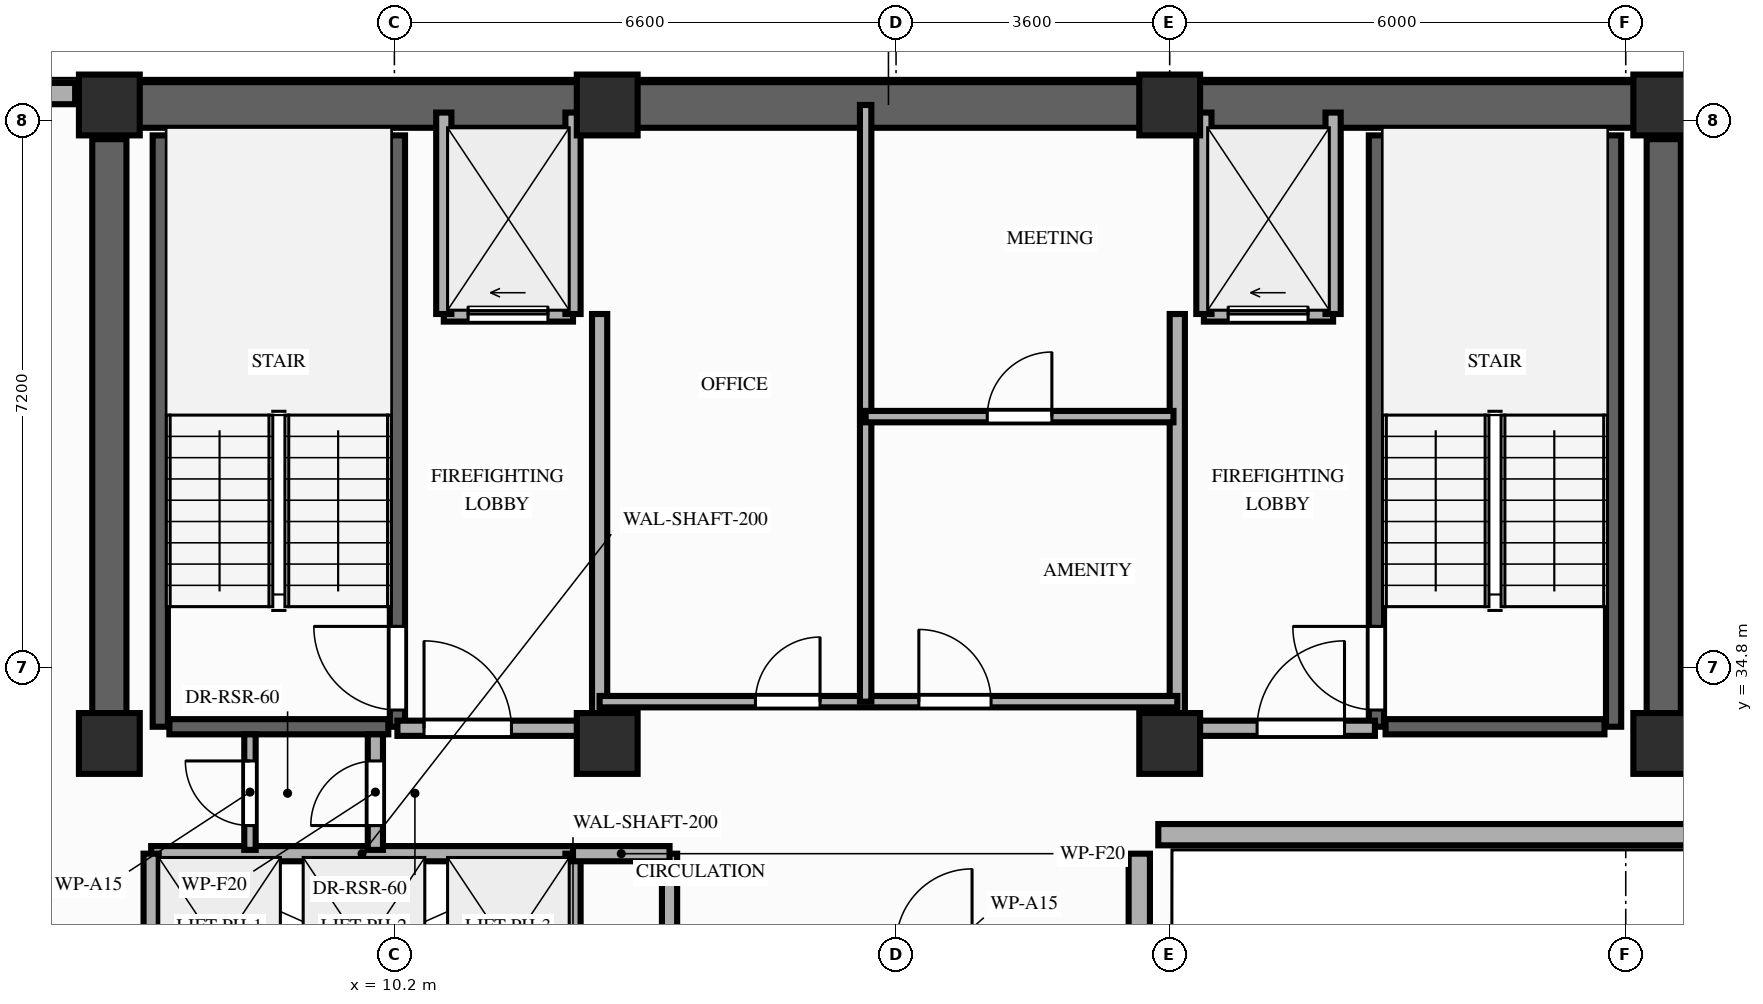
"""IFC4 building model, lengths in metres.
Left out: names, types, materials, properties, quantities, classifications, styles, units other than length and angle.
Written with IfcOpenShell. Run it as: python <this file> out.ifc"""

import sys

from ifc_helpers import new_model, si_unit, direction, frame, frame_2d, origin, origin_2d, place, context, subcontext, project, spatial, rectangle, extrude, element, fill, save


model = new_model("IFC4")
c1 = context("Model", 3, precision=1e-05, world=origin(), true_north=direction((0.0, 1.0)))
c2 = subcontext(c1, "Body", "Model", "MODEL_VIEW")
j1 = project(units=[si_unit("LENGTHUNIT", "METRE"), si_unit("PLANEANGLEUNIT", "RADIAN")], contexts=[c1])
p1 = place(None, origin())
s1 = spatial("IfcSite", under=j1, at=p1, CompositionType="ELEMENT")
p2 = place(p1, origin())
s2 = spatial("IfcBuilding", under=s1, at=p2, CompositionType="ELEMENT")
p3 = place(p2, frame((0.0, 0.0, 231.2)))
s3 = spatial("IfcBuildingStorey", under=s2, at=p3, CompositionType="ELEMENT", Elevation=231.2)
for number, where, z_axis, x_axis in (
    (1, (6.45, 33.8, 0.0), (0.0, 0.0, 1.0), (1.0, 0.0, 0.0)),
    (2, (13.0, 33.8, 0.0), (0.0, 0.0, 1.0), (1.0, 0.0, 0.0)),
    (3, (20.4, 33.8, 0.0), (0.0, 0.0, 1.0), (1.0, 0.0, 0.0)),
    (4, (26.9, 33.8, 0.0), (0.0, 0.0, 1.0), (1.0, 0.0, 0.0)),
    (5, (6.45, 42.2, 0.0), (0.0, 0.0, 1.0), (1.0, 0.0, 0.0)),
    (6, (13.0, 42.2, 0.0), (0.0, 0.0, 1.0), (1.0, 0.0, 0.0)),
    (7, (20.4, 42.2, 0.0), (0.0, 0.0, 1.0), (1.0, 0.0, 0.0)),
    (8, (26.9, 42.2, 0.0), (0.0, 0.0, 1.0), (1.0, 0.0, 0.0)),
):
    element("IfcColumn", number, at=place(p3, frame(where, z_axis=z_axis, x_axis=x_axis)), inside=s3, PredefinedType="COLUMN", context=c2, shape_type="SweptSolid", body=[
        extrude(rectangle(XDim=0.8, YDim=0.8, at=origin_2d()), origin(), (0.0, 0.0, 1.0), 3.2),
    ])
p4 = place(p3, frame((20.0, 8.8, 0.0), z_axis=(0.0, 0.0, 1.0), x_axis=(0.0, 1.0, 0.0)))
e9 = element("IfcWall", 9, at=p4, inside=s3, PredefinedType="STANDARD", context=c2, shape_type="SweptSolid", body=[
    extrude(rectangle(XDim=23.55, YDim=0.28, at=frame_2d((11.775, 0.0))), origin(), (0.0, 0.0, 1.0), 2.56),
])
p5 = place(p4, frame((20.86, 0.0, 0.85)))
e10 = element("IfcOpeningElement", 10, at=p5, cuts=e9, PredefinedType="OPENING", context=c2, shape_type="SweptSolid", body=[
    extrude(rectangle(XDim=1.1, YDim=1.46, at=frame_2d((0.55, 0.73))), frame((0.0, 0.15, 0.0), z_axis=(0.0, -1.0, 0.0), x_axis=(1.0, 0.0, 0.0)), (0.0, 0.0, 1.0), 0.3),
])
p6 = place(p4, frame((4.58, 0.0, 0.85)))
e11 = element("IfcOpeningElement", 11, at=p6, cuts=e9, PredefinedType="OPENING", context=c2, shape_type="SweptSolid", body=[
    extrude(rectangle(XDim=0.8, YDim=1.46, at=frame_2d((0.4, 0.73))), frame((0.0, 0.15, 0.0), z_axis=(0.0, -1.0, 0.0), x_axis=(1.0, 0.0, 0.0)), (0.0, 0.0, 1.0), 0.3),
])
p7 = place(p4, frame((10.85, 0.0, 0.85)))
e12 = element("IfcOpeningElement", 12, at=p7, cuts=e9, PredefinedType="OPENING", context=c2, shape_type="SweptSolid", body=[
    extrude(rectangle(XDim=2.1, YDim=1.46, at=frame_2d((1.05, 0.73))), frame((0.0, 0.15, 0.0), z_axis=(0.0, -1.0, 0.0), x_axis=(1.0, 0.0, 0.0)), (0.0, 0.0, 1.0), 0.3),
])
p8 = place(p3, frame((6.0, 42.35, 0.0), z_axis=(0.0, 0.0, 1.0), x_axis=(-1.0, 0.0, 0.0)))
e13 = element("IfcWall", 13, at=p8, inside=s3, PredefinedType="STANDARD", context=c2, shape_type="SweptSolid", body=[
    extrude(rectangle(XDim=2.0, YDim=0.28, at=frame_2d((1.0, 0.0))), origin(), (0.0, 0.0, 1.0), 3.02),
])
p9 = place(p3, frame((20.25, 32.6, 0.0), z_axis=(0.0, 0.0, 1.0), x_axis=(1.0, 0.0, 0.0)))
e14 = element("IfcWall", 14, at=p9, inside=s3, PredefinedType="STANDARD", context=c2, shape_type="SweptSolid", body=[
    extrude(rectangle(XDim=7.35, YDim=0.28, at=frame_2d((3.675, 0.0))), origin(), (0.0, 0.0, 1.0), 2.56),
])
p10 = place(p3, frame((6.45, 42.2, 0.0), z_axis=(0.0, 0.0, 1.0), x_axis=(1.0, 0.0, 0.0)))
e15 = element("IfcWall", 15, at=p10, inside=s3, PredefinedType="SHEAR", context=c2, shape_type="SweptSolid", body=[
    extrude(rectangle(XDim=20.45, YDim=0.6, at=frame_2d((10.225, 0.0))), origin(), (0.0, 0.0, 1.0), 3.02),
])
for number, where, z_axis, x_axis in (
    (16, (6.45, 33.8, 0.0), (0.0, 0.0, 1.0), (0.0, 1.0, 0.0)),
    (17, (26.9, 33.8, 0.0), (0.0, 0.0, 1.0), (0.0, 1.0, 0.0)),
):
    element("IfcWall", number, at=place(p3, frame(where, z_axis=z_axis, x_axis=x_axis)), inside=s3, PredefinedType="SHEAR", context=c2, shape_type="SweptSolid", body=[
        extrude(rectangle(XDim=7.95, YDim=0.45, at=frame_2d((3.975, 0.0))), origin(), (0.0, 0.0, 1.0), 3.02),
    ])
p11 = place(p3, frame((7.12, 34.02, 0.0), z_axis=(0.0, 0.0, 1.0), x_axis=(0.0, 1.0, 0.0)))
e18 = element("IfcWall", 18, at=p11, inside=s3, PredefinedType="SHEAR", context=c2, shape_type="SweptSolid", body=[
    extrude(rectangle(XDim=7.78, YDim=0.2, at=frame_2d((3.89, 0.0))), origin(), (0.0, 0.0, 1.0), 3.02),
])
p12 = place(p3, frame((10.24, 34.02, 0.0), z_axis=(0.0, 0.0, 1.0), x_axis=(0.0, 1.0, 0.0)))
e19 = element("IfcWall", 19, at=p12, inside=s3, PredefinedType="SHEAR", context=c2, shape_type="SweptSolid", body=[
    extrude(rectangle(XDim=7.78, YDim=0.2, at=frame_2d((3.89, 0.0))), origin(), (0.0, 0.0, 1.0), 3.02),
])
p13 = place(p12, frame((0.22, 0.0, 0.0)))
e20 = element("IfcOpeningElement", 20, at=p13, cuts=e19, PredefinedType="OPENING", context=c2, shape_type="SweptSolid", body=[
    extrude(rectangle(XDim=1.1, YDim=2.15, at=frame_2d((0.55, 1.075))), frame((0.0, 0.11, 0.0), z_axis=(0.0, -1.0, 0.0), x_axis=(1.0, 0.0, 0.0)), (0.0, 0.0, 1.0), 0.22),
])
p14 = place(p3, frame((7.24, 34.02, 0.0), z_axis=(0.0, 0.0, 1.0), x_axis=(1.0, 0.0, 0.0)))
e21 = element("IfcWall", 21, at=p14, inside=s3, PredefinedType="SHEAR", context=c2, shape_type="SweptSolid", body=[
    extrude(rectangle(XDim=2.88, YDim=0.2, at=frame_2d((1.44, 0.0))), origin(), (0.0, 0.0, 1.0), 3.02),
])
p15 = place(p3, frame((23.12, 34.02, 0.0), z_axis=(0.0, 0.0, 1.0), x_axis=(0.0, 1.0, 0.0)))
e22 = element("IfcWall", 22, at=p15, inside=s3, PredefinedType="SHEAR", context=c2, shape_type="SweptSolid", body=[
    extrude(rectangle(XDim=7.78, YDim=0.2, at=frame_2d((3.89, 0.0))), origin(), (0.0, 0.0, 1.0), 3.02),
])
p16 = place(p15, frame((0.22, 0.0, 0.0)))
e23 = element("IfcOpeningElement", 23, at=p16, cuts=e22, PredefinedType="OPENING", context=c2, shape_type="SweptSolid", body=[
    extrude(rectangle(XDim=1.1, YDim=2.15, at=frame_2d((0.55, 1.075))), frame((0.0, 0.11, 0.0), z_axis=(0.0, -1.0, 0.0), x_axis=(1.0, 0.0, 0.0)), (0.0, 0.0, 1.0), 0.22),
])
p17 = place(p3, frame((26.24, 34.02, 0.0), z_axis=(0.0, 0.0, 1.0), x_axis=(0.0, 1.0, 0.0)))
e24 = element("IfcWall", 24, at=p17, inside=s3, PredefinedType="SHEAR", context=c2, shape_type="SweptSolid", body=[
    extrude(rectangle(XDim=7.78, YDim=0.2, at=frame_2d((3.89, 0.0))), origin(), (0.0, 0.0, 1.0), 3.02),
])
p18 = place(p3, frame((23.24, 34.02, 0.0), z_axis=(0.0, 0.0, 1.0), x_axis=(1.0, 0.0, 0.0)))
e25 = element("IfcWall", 25, at=p18, inside=s3, PredefinedType="SHEAR", context=c2, shape_type="SweptSolid", body=[
    extrude(rectangle(XDim=2.88, YDim=0.2, at=frame_2d((1.44, 0.0))), origin(), (0.0, 0.0, 1.0), 3.02),
])
p19 = place(p3, frame((7.0, 32.35, 0.0), z_axis=(0.0, 0.0, 1.0), x_axis=(1.0, 0.0, 0.0)))
e26 = element("IfcWall", 26, at=p19, inside=s3, PredefinedType="MOVABLE", context=c2, shape_type="SweptSolid", body=[
    extrude(rectangle(XDim=5.55, YDim=0.2, at=frame_2d((2.775, 0.0))), origin(), (0.0, 0.0, 1.0), 3.02),
])
for number, where, z_axis, x_axis in (
    (27, (7.0, 29.85, 0.0), (0.0, 0.0, 1.0), (0.0, 1.0, 0.0)),
    (28, (12.55, 29.85, 0.0), (0.0, 0.0, 1.0), (0.0, 1.0, 0.0)),
):
    element("IfcWall", number, at=place(p3, frame(where, z_axis=z_axis, x_axis=x_axis)), inside=s3, PredefinedType="MOVABLE", context=c2, shape_type="SweptSolid", body=[
        extrude(rectangle(XDim=2.5, YDim=0.2, at=frame_2d((1.25, 0.0))), origin(), (0.0, 0.0, 1.0), 3.02),
    ])
p20 = place(p3, frame((10.85, 39.45, 0.0), z_axis=(0.0, 0.0, 1.0), x_axis=(1.0, 0.0, 0.0)))
e29 = element("IfcWall", 29, at=p20, inside=s3, PredefinedType="MOVABLE", context=c2, shape_type="SweptSolid", body=[
    extrude(rectangle(XDim=1.7, YDim=0.2, at=frame_2d((0.85, 0.0))), origin(), (0.0, 0.0, 1.0), 3.02),
])
p21 = place(p20, frame((0.32, 0.0, 0.0)))
e30 = element("IfcOpeningElement", 30, at=p21, cuts=e29, PredefinedType="OPENING", context=c2, shape_type="SweptSolid", body=[
    extrude(rectangle(XDim=1.05, YDim=2.15, at=frame_2d((0.525, 1.075))), frame((0.0, 0.11, 0.0), z_axis=(0.0, -1.0, 0.0), x_axis=(1.0, 0.0, 0.0)), (0.0, 0.0, 1.0), 0.22),
])
p22 = place(p3, frame((20.85, 39.45, 0.0), z_axis=(0.0, 0.0, 1.0), x_axis=(1.0, 0.0, 0.0)))
e31 = element("IfcWall", 31, at=p22, inside=s3, PredefinedType="MOVABLE", context=c2, shape_type="SweptSolid", body=[
    extrude(rectangle(XDim=1.7, YDim=0.2, at=frame_2d((0.85, 0.0))), origin(), (0.0, 0.0, 1.0), 3.02),
])
p23 = place(p22, frame((0.32, 0.0, 0.0)))
e32 = element("IfcOpeningElement", 32, at=p23, cuts=e31, PredefinedType="OPENING", context=c2, shape_type="SweptSolid", body=[
    extrude(rectangle(XDim=1.05, YDim=2.15, at=frame_2d((0.525, 1.075))), frame((0.0, 0.11, 0.0), z_axis=(0.0, -1.0, 0.0), x_axis=(1.0, 0.0, 0.0)), (0.0, 0.0, 1.0), 0.22),
])
for number, where, z_axis, x_axis in (
    (33, (10.85, 39.45, 0.0), (0.0, 0.0, 1.0), (0.0, 1.0, 0.0)),
    (34, (12.55, 39.45, 0.0), (0.0, 0.0, 1.0), (0.0, 1.0, 0.0)),
):
    element("IfcWall", number, at=place(p3, frame(where, z_axis=z_axis, x_axis=x_axis)), inside=s3, PredefinedType="MOVABLE", context=c2, shape_type="SweptSolid", body=[
        extrude(rectangle(XDim=2.65, YDim=0.2, at=frame_2d((1.325, 0.0))), origin(), (0.0, 0.0, 1.0), 2.56),
    ])
p24 = place(p3, frame((12.9, 34.0, 0.0), z_axis=(0.0, 0.0, 1.0), x_axis=(0.0, 1.0, 0.0)))
e35 = element("IfcWall", 35, at=p24, inside=s3, PredefinedType="PARTITIONING", context=c2, shape_type="SweptSolid", body=[
    extrude(rectangle(XDim=5.45, YDim=0.2, at=frame_2d((2.725, 0.0))), origin(), (0.0, 0.0, 1.0), 2.56),
])
p25 = place(p3, frame((10.24, 34.0, 0.0), z_axis=(0.0, 0.0, 1.0), x_axis=(1.0, 0.0, 0.0)))
e36 = element("IfcWall", 36, at=p25, inside=s3, PredefinedType="PARTITIONING", context=c2, shape_type="SweptSolid", body=[
    extrude(rectangle(XDim=2.66, YDim=0.2, at=frame_2d((1.33, 0.0))), origin(), (0.0, 0.0, 1.0), 2.56),
])
p26 = place(p25, frame((0.35, 0.0, 0.0)))
e37 = element("IfcOpeningElement", 37, at=p26, cuts=e36, PredefinedType="OPENING", context=c2, shape_type="SweptSolid", body=[
    extrude(rectangle(XDim=1.15, YDim=2.15, at=frame_2d((0.575, 1.075))), frame((0.0, 0.11, 0.0), z_axis=(0.0, -1.0, 0.0), x_axis=(1.0, 0.0, 0.0)), (0.0, 0.0, 1.0), 0.22),
])
for number, where, z_axis, x_axis in (
    (38, (20.85, 39.45, 0.0), (0.0, 0.0, 1.0), (0.0, 1.0, 0.0)),
    (39, (22.55, 39.45, 0.0), (0.0, 0.0, 1.0), (0.0, 1.0, 0.0)),
):
    element("IfcWall", number, at=place(p3, frame(where, z_axis=z_axis, x_axis=x_axis)), inside=s3, PredefinedType="MOVABLE", context=c2, shape_type="SweptSolid", body=[
        extrude(rectangle(XDim=2.65, YDim=0.2, at=frame_2d((1.325, 0.0))), origin(), (0.0, 0.0, 1.0), 2.56),
    ])
p27 = place(p3, frame((20.5, 34.0, 0.0), z_axis=(0.0, 0.0, 1.0), x_axis=(0.0, 1.0, 0.0)))
e40 = element("IfcWall", 40, at=p27, inside=s3, PredefinedType="PARTITIONING", context=c2, shape_type="SweptSolid", body=[
    extrude(rectangle(XDim=5.45, YDim=0.2, at=frame_2d((2.725, 0.0))), origin(), (0.0, 0.0, 1.0), 2.56),
])
p28 = place(p3, frame((20.5, 34.0, 0.0), z_axis=(0.0, 0.0, 1.0), x_axis=(1.0, 0.0, 0.0)))
e41 = element("IfcWall", 41, at=p28, inside=s3, PredefinedType="PARTITIONING", context=c2, shape_type="SweptSolid", body=[
    extrude(rectangle(XDim=2.6, YDim=0.2, at=frame_2d((1.3, 0.0))), origin(), (0.0, 0.0, 1.0), 2.56),
])
p29 = place(p28, frame((1.05, 0.0, 0.0)))
e42 = element("IfcOpeningElement", 42, at=p29, cuts=e41, PredefinedType="OPENING", context=c2, shape_type="SweptSolid", body=[
    extrude(rectangle(XDim=1.15, YDim=2.15, at=frame_2d((0.575, 1.075))), frame((0.0, 0.11, 0.0), z_axis=(0.0, -1.0, 0.0), x_axis=(1.0, 0.0, 0.0)), (0.0, 0.0, 1.0), 0.22),
])
p30 = place(p3, frame((9.95, 32.4, 0.0), z_axis=(0.0, 0.0, 1.0), x_axis=(0.0, 1.0, 0.0)))
e43 = element("IfcWall", 43, at=p30, inside=s3, PredefinedType="PARTITIONING", context=c2, shape_type="SweptSolid", body=[
    extrude(rectangle(XDim=1.52, YDim=0.2, at=frame_2d((0.76, 0.0))), origin(), (0.0, 0.0, 1.0), 2.56),
])
p31 = place(p30, frame((0.32, 0.0, 0.0)))
e44 = element("IfcOpeningElement", 44, at=p31, cuts=e43, PredefinedType="OPENING", context=c2, shape_type="SweptSolid", body=[
    extrude(rectangle(XDim=0.85, YDim=2.05, at=frame_2d((0.425, 1.025))), frame((0.0, 0.11, 0.0), z_axis=(0.0, -1.0, 0.0), x_axis=(1.0, 0.0, 0.0)), (0.0, 0.0, 1.0), 0.22),
])
p32 = place(p3, frame((8.3, 32.4, 0.0), z_axis=(0.0, 0.0, 1.0), x_axis=(0.0, 1.0, 0.0)))
e45 = element("IfcWall", 45, at=p32, inside=s3, PredefinedType="PARTITIONING", context=c2, shape_type="SweptSolid", body=[
    extrude(rectangle(XDim=1.52, YDim=0.15, at=frame_2d((0.76, 0.0))), origin(), (0.0, 0.0, 1.0), 2.56),
])
p33 = place(p32, frame((0.32, 0.0, 0.0)))
e46 = element("IfcOpeningElement", 46, at=p33, cuts=e45, PredefinedType="OPENING", context=c2, shape_type="SweptSolid", body=[
    extrude(rectangle(XDim=0.85, YDim=2.05, at=frame_2d((0.425, 1.025))), frame((0.0, 0.085, 0.0), z_axis=(0.0, -1.0, 0.0), x_axis=(1.0, 0.0, 0.0)), (0.0, 0.0, 1.0), 0.17),
])
p34 = place(p3, frame((13.82, 29.85, 0.0), z_axis=(0.0, 0.0, 1.0), x_axis=(0.0, 1.0, 0.0)))
e47 = element("IfcWall", 47, at=p34, inside=s3, PredefinedType="PARTITIONING", context=c2, shape_type="SweptSolid", body=[
    extrude(rectangle(XDim=2.5, YDim=0.2, at=frame_2d((1.25, 0.0))), origin(), (0.0, 0.0, 1.0), 3.02),
])
p35 = place(p3, frame((12.55, 32.35, 0.0), z_axis=(0.0, 0.0, 1.0), x_axis=(1.0, 0.0, 0.0)))
e48 = element("IfcWall", 48, at=p35, inside=s3, PredefinedType="PARTITIONING", context=c2, shape_type="SweptSolid", body=[
    extrude(rectangle(XDim=1.27, YDim=0.2, at=frame_2d((0.635, 0.0))), origin(), (0.0, 0.0, 1.0), 3.02),
])
p36 = place(p3, frame((12.9, 34.35, 0.0), z_axis=(0.0, 0.0, 1.0), x_axis=(1.0, 0.0, 0.0)))
e49 = element("IfcWall", 49, at=p36, inside=s3, PredefinedType="PARTITIONING", context=c2, shape_type="SweptSolid", body=[
    extrude(rectangle(XDim=7.6, YDim=0.15, at=frame_2d((3.8, 0.0))), origin(), (0.0, 0.0, 1.0), 3.02),
])
p37 = place(p36, frame((2.05, 0.0, 0.0)))
e50 = element("IfcOpeningElement", 50, at=p37, cuts=e49, PredefinedType="OPENING", context=c2, shape_type="SweptSolid", body=[
    extrude(rectangle(XDim=0.85, YDim=2.05, at=frame_2d((0.425, 1.025))), frame((0.0, 0.085, 0.0), z_axis=(0.0, -1.0, 0.0), x_axis=(1.0, 0.0, 0.0)), (0.0, 0.0, 1.0), 0.17),
])
p38 = place(p36, frame((4.2, 0.0, 0.0)))
e51 = element("IfcOpeningElement", 51, at=p38, cuts=e49, PredefinedType="OPENING", context=c2, shape_type="SweptSolid", body=[
    extrude(rectangle(XDim=0.95, YDim=2.15, at=frame_2d((0.475, 1.075))), frame((0.0, 0.085, 0.0), z_axis=(0.0, -1.0, 0.0), x_axis=(1.0, 0.0, 0.0)), (0.0, 0.0, 1.0), 0.17),
])
p39 = place(p3, frame((16.4, 34.35, 0.0), z_axis=(0.0, 0.0, 1.0), x_axis=(0.0, 1.0, 0.0)))
e52 = element("IfcWall", 52, at=p39, inside=s3, PredefinedType="PARTITIONING", context=c2, shape_type="SweptSolid", body=[
    extrude(rectangle(XDim=7.85, YDim=0.15, at=frame_2d((3.925, 0.0))), origin(), (0.0, 0.0, 1.0), 2.56),
])
p40 = place(p3, frame((16.4, 38.1, 0.0), z_axis=(0.0, 0.0, 1.0), x_axis=(1.0, 0.0, 0.0)))
e53 = element("IfcWall", 53, at=p40, inside=s3, PredefinedType="PARTITIONING", context=c2, shape_type="SweptSolid", body=[
    extrude(rectangle(XDim=4.05, YDim=0.15, at=frame_2d((2.025, 0.0))), origin(), (0.0, 0.0, 1.0), 3.02),
])
p41 = place(p40, frame((1.6, 0.0, 0.0)))
e54 = element("IfcOpeningElement", 54, at=p41, cuts=e53, PredefinedType="OPENING", context=c2, shape_type="SweptSolid", body=[
    extrude(rectangle(XDim=0.85, YDim=2.05, at=frame_2d((0.425, 1.025))), frame((0.0, 0.085, 0.0), z_axis=(0.0, -1.0, 0.0), x_axis=(1.0, 0.0, 0.0)), (0.0, 0.0, 1.0), 0.17),
])
p42 = place(p13, origin())
e55 = element("IfcDoor", 55, at=p42, inside=s3, OperationType="SINGLE_SWING_RIGHT", PredefinedType="DOOR", context=c2, shape_type="SweptSolid", body=[
    extrude(rectangle(XDim=1.1, YDim=2.15, at=frame_2d((0.55, 1.075))), frame((0.0, 0.025, 0.0), z_axis=(0.0, -1.0, 0.0), x_axis=(1.0, 0.0, 0.0)), (0.0, 0.0, 1.0), 0.05),
])
fill(e20, e55)
p43 = place(p16, origin())
e56 = element("IfcDoor", 56, at=p43, inside=s3, OperationType="SINGLE_SWING_RIGHT", PredefinedType="DOOR", context=c2, shape_type="SweptSolid", body=[
    extrude(rectangle(XDim=1.1, YDim=2.15, at=frame_2d((0.55, 1.075))), frame((0.0, 0.025, 0.0), z_axis=(0.0, -1.0, 0.0), x_axis=(1.0, 0.0, 0.0)), (0.0, 0.0, 1.0), 0.05),
])
fill(e23, e56)
p44 = place(p21, origin())
e57 = element("IfcDoor", 57, at=p44, inside=s3, OperationType="SLIDING_TO_LEFT", PredefinedType="DOOR", context=c2, shape_type="SweptSolid", body=[
    extrude(rectangle(XDim=1.05, YDim=2.15, at=frame_2d((0.525, 1.075))), frame((0.0, 0.025, 0.0), z_axis=(0.0, -1.0, 0.0), x_axis=(1.0, 0.0, 0.0)), (0.0, 0.0, 1.0), 0.05),
])
fill(e30, e57)
p45 = place(p23, origin())
e58 = element("IfcDoor", 58, at=p45, inside=s3, OperationType="SLIDING_TO_LEFT", PredefinedType="DOOR", context=c2, shape_type="SweptSolid", body=[
    extrude(rectangle(XDim=1.05, YDim=2.15, at=frame_2d((0.525, 1.075))), frame((0.0, 0.025, 0.0), z_axis=(0.0, -1.0, 0.0), x_axis=(1.0, 0.0, 0.0)), (0.0, 0.0, 1.0), 0.05),
])
fill(e32, e58)
p46 = place(p26, origin())
e59 = element("IfcDoor", 59, at=p46, inside=s3, OperationType="SINGLE_SWING_LEFT", PredefinedType="DOOR", context=c2, shape_type="SweptSolid", body=[
    extrude(rectangle(XDim=1.15, YDim=2.15, at=frame_2d((0.575, 1.075))), frame((0.0, 0.025, 0.0), z_axis=(0.0, -1.0, 0.0), x_axis=(1.0, 0.0, 0.0)), (0.0, 0.0, 1.0), 0.05),
])
fill(e37, e59)
p47 = place(p29, origin())
e60 = element("IfcDoor", 60, at=p47, inside=s3, OperationType="SINGLE_SWING_RIGHT", PredefinedType="DOOR", context=c2, shape_type="SweptSolid", body=[
    extrude(rectangle(XDim=1.15, YDim=2.15, at=frame_2d((0.575, 1.075))), frame((0.0, 0.025, 0.0), z_axis=(0.0, -1.0, 0.0), x_axis=(1.0, 0.0, 0.0)), (0.0, 0.0, 1.0), 0.05),
])
fill(e42, e60)
p48 = place(p31, origin())
e61 = element("IfcDoor", 61, at=p48, inside=s3, OperationType="SINGLE_SWING_LEFT", PredefinedType="DOOR", context=c2, shape_type="SweptSolid", body=[
    extrude(rectangle(XDim=0.85, YDim=2.05, at=frame_2d((0.425, 1.025))), frame((0.0, 0.025, 0.0), z_axis=(0.0, -1.0, 0.0), x_axis=(1.0, 0.0, 0.0)), (0.0, 0.0, 1.0), 0.05),
])
fill(e44, e61)
p49 = place(p33, origin())
e62 = element("IfcDoor", 62, at=p49, inside=s3, OperationType="SINGLE_SWING_RIGHT", PredefinedType="DOOR", context=c2, shape_type="SweptSolid", body=[
    extrude(rectangle(XDim=0.85, YDim=2.05, at=frame_2d((0.425, 1.025))), frame((0.0, 0.025, 0.0), z_axis=(0.0, -1.0, 0.0), x_axis=(1.0, 0.0, 0.0)), (0.0, 0.0, 1.0), 0.05),
])
fill(e46, e62)
p50 = place(p37, origin())
e63 = element("IfcDoor", 63, at=p50, inside=s3, OperationType="SINGLE_SWING_RIGHT", PredefinedType="DOOR", context=c2, shape_type="SweptSolid", body=[
    extrude(rectangle(XDim=0.85, YDim=2.05, at=frame_2d((0.425, 1.025))), frame((0.0, 0.025, 0.0), z_axis=(0.0, -1.0, 0.0), x_axis=(1.0, 0.0, 0.0)), (0.0, 0.0, 1.0), 0.05),
])
fill(e50, e63)
p51 = place(p38, origin())
e64 = element("IfcDoor", 64, at=p51, inside=s3, OperationType="SINGLE_SWING_LEFT", PredefinedType="DOOR", context=c2, shape_type="SweptSolid", body=[
    extrude(rectangle(XDim=0.95, YDim=2.15, at=frame_2d((0.475, 1.075))), frame((0.0, 0.025, 0.0), z_axis=(0.0, -1.0, 0.0), x_axis=(1.0, 0.0, 0.0)), (0.0, 0.0, 1.0), 0.05),
])
fill(e51, e64)
p52 = place(p41, origin())
e65 = element("IfcDoor", 65, at=p52, inside=s3, OperationType="SINGLE_SWING_RIGHT", PredefinedType="DOOR", context=c2, shape_type="SweptSolid", body=[
    extrude(rectangle(XDim=0.85, YDim=2.05, at=frame_2d((0.425, 1.025))), frame((0.0, 0.025, 0.0), z_axis=(0.0, -1.0, 0.0), x_axis=(1.0, 0.0, 0.0)), (0.0, 0.0, 1.0), 0.05),
])
fill(e54, e65)
save(model, sys.argv[1])
